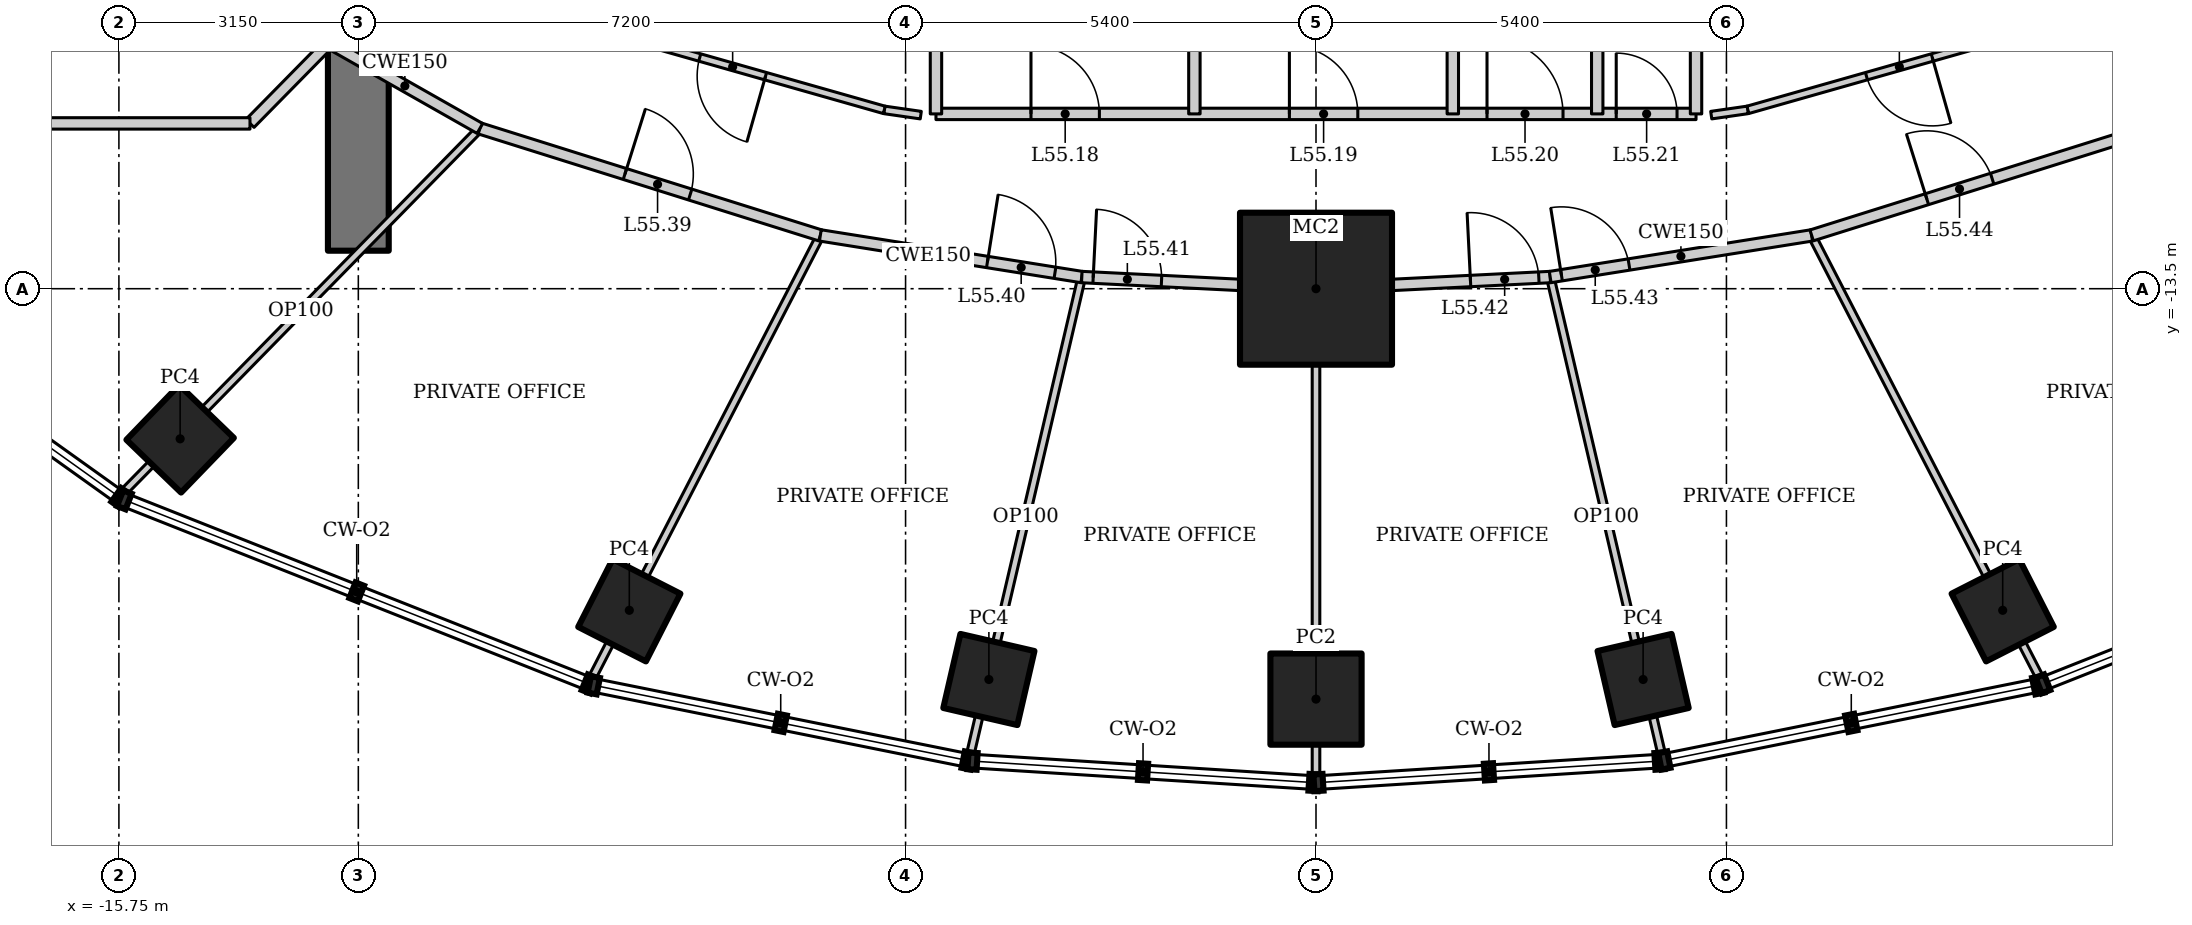
"""IFC4 building model, lengths in metres.
Left out: names, types, materials, properties, quantities, classifications, styles, units other than length and angle.
Written with IfcOpenShell. Run it as: python <this file> out.ifc"""

import sys

from ifc_helpers import new_model, si_unit, direction, frame, frame_2d, origin, origin_2d, place, context, subcontext, project, spatial, rectangle, hollow_rectangle, extrude, element, fill, save


model = new_model("IFC4")
c1 = context("Model", 3, precision=1e-05, world=origin(), true_north=direction((0.0, 1.0)))
c2 = subcontext(c1, "Body", "Model", "MODEL_VIEW")
j1 = project(units=[si_unit("LENGTHUNIT", "METRE"), si_unit("PLANEANGLEUNIT", "RADIAN")], contexts=[c1])
p1 = place(None, origin())
s1 = spatial("IfcSite", under=j1, at=p1, CompositionType="ELEMENT")
p2 = place(p1, origin())
s2 = spatial("IfcBuilding", under=s1, at=p2, CompositionType="ELEMENT")
p3 = place(p2, frame((0.0, 0.0, 236.8)))
s3 = spatial("IfcBuildingStorey", under=s2, at=p3, CompositionType="ELEMENT", Elevation=236.8)
p4 = place(p3, frame((0.0, -13.5, 0.0), z_axis=(0.0, 0.0, 1.0), x_axis=(1.0, 0.0, 0.0)))
e1 = element("IfcColumn", 1, at=p4, inside=s3, PredefinedType="COLUMN", context=c2, shape_type="SweptSolid", body=[
    extrude(hollow_rectangle(XDim=2.0, YDim=2.0, WallThickness=0.17, at=origin_2d()), origin(), (0.0, 0.0, 1.0), 4.2),
])
for number, where, z_axis, x_axis in (
    (2, (-14.944, -15.475, 0.0), (0.0, 0.0, 1.0), (0.695, 0.719, 0.0)),
    (3, (-9.035, -17.731, 0.0), (0.0, 0.0, 1.0), (0.454, 0.891, 0.0)),
    (4, (-4.304, -18.642, 0.0), (0.0, 0.0, 1.0), (0.225, 0.974, 0.0)),
):
    element("IfcColumn", number, at=place(p3, frame(where, z_axis=z_axis, x_axis=x_axis)), inside=s3, PredefinedType="COLUMN", context=c2, shape_type="SweptSolid", body=[
        extrude(hollow_rectangle(XDim=1.0, YDim=1.0, WallThickness=0.08, at=origin_2d()), origin(), (0.0, 0.0, 1.0), 4.2),
    ])
p5 = place(p3, frame((0.0, -18.9, 0.0), z_axis=(0.0, 0.0, 1.0), x_axis=(1.0, 0.0, 0.0)))
e5 = element("IfcColumn", 5, at=p5, inside=s3, PredefinedType="COLUMN", context=c2, shape_type="SweptSolid", body=[
    extrude(hollow_rectangle(XDim=1.2, YDim=1.2, WallThickness=0.1, at=origin_2d()), origin(), (0.0, 0.0, 1.0), 4.2),
])
for number, where, z_axis, x_axis in (
    (6, (4.304, -18.642, 0.0), (0.0, 0.0, 1.0), (0.974, 0.225, 0.0)),
    (7, (9.035, -17.731, 0.0), (0.0, 0.0, 1.0), (0.891, 0.454, 0.0)),
):
    element("IfcColumn", number, at=place(p3, frame(where, z_axis=z_axis, x_axis=x_axis)), inside=s3, PredefinedType="COLUMN", context=c2, shape_type="SweptSolid", body=[
        extrude(hollow_rectangle(XDim=1.0, YDim=1.0, WallThickness=0.08, at=origin_2d()), origin(), (0.0, 0.0, 1.0), 4.2),
    ])
p6 = place(p3, frame((-12.6, 13.0, 0.0), z_axis=(0.0, 0.0, 1.0), x_axis=(0.0, -1.0, 0.0)))
e8 = element("IfcWall", 8, at=p6, inside=s3, PredefinedType="SHEAR", context=c2, shape_type="SweptSolid", body=[
    extrude(rectangle(XDim=26.0, YDim=0.8, at=frame_2d((13.0, 0.0))), origin(), (0.0, 0.0, 1.0), 4.2),
])
p7 = place(p6, frame((12.1, 0.0, 0.0)))
e9 = element("IfcOpeningElement", 9, at=p7, cuts=e8, PredefinedType="OPENING", context=c2, shape_type="SweptSolid", body=[
    extrude(rectangle(XDim=1.8, YDim=2.1, at=frame_2d((0.9, 1.05))), frame((0.0, 0.41, 0.0), z_axis=(0.0, -1.0, 0.0), x_axis=(1.0, 0.0, 0.0)), (0.0, 0.0, 1.0), 0.82),
])
p8 = place(p3, frame((-15.709, -16.199, 0.0), z_axis=(0.0, 0.0, 1.0), x_axis=(0.699758297028, 0.71437967898, 0.0)))
e10 = element("IfcWall", 10, at=p8, inside=s3, PredefinedType="PARTITIONING", context=c2, shape_type="SweptSolid", body=[
    extrude(rectangle(XDim=6.729, YDim=0.1, at=frame_2d((3.365, 0.0))), origin(), (0.0, 0.0, 1.0), 3.41),
])
p9 = place(p3, frame((-9.54, -18.65, 0.0), z_axis=(0.0, 0.0, 1.0), x_axis=(0.458420942987, 0.888735190611, 0.0)))
e11 = element("IfcWall", 11, at=p9, inside=s3, PredefinedType="PARTITIONING", context=c2, shape_type="SweptSolid", body=[
    extrude(rectangle(XDim=6.584, YDim=0.1, at=frame_2d((3.292, 0.0))), origin(), (0.0, 0.0, 1.0), 3.293),
])
p10 = place(p3, frame((-4.556, -19.657, 0.0), z_axis=(0.0, 0.0, 1.0), x_axis=(0.227524978141, 0.973772244584, 0.0)))
e12 = element("IfcWall", 12, at=p10, inside=s3, PredefinedType="PARTITIONING", context=c2, shape_type="SweptSolid", body=[
    extrude(rectangle(XDim=6.48, YDim=0.1, at=frame_2d((3.24, 0.0))), origin(), (0.0, 0.0, 1.0), 3.293),
])
p11 = place(p3, frame((0.0, -19.945, 0.0), z_axis=(0.0, 0.0, 1.0), x_axis=(0.0, 1.0, 0.0)))
e13 = element("IfcWall", 13, at=p11, inside=s3, PredefinedType="PARTITIONING", context=c2, shape_type="SweptSolid", body=[
    extrude(rectangle(XDim=6.445, YDim=0.1, at=frame_2d((3.222, 0.0))), origin(), (0.0, 0.0, 1.0), 3.646),
])
p12 = place(p3, frame((4.556, -19.657, 0.0), z_axis=(0.0, 0.0, 1.0), x_axis=(-0.227524978141, 0.973772244584, 0.0)))
e14 = element("IfcWall", 14, at=p12, inside=s3, PredefinedType="PARTITIONING", context=c2, shape_type="SweptSolid", body=[
    extrude(rectangle(XDim=6.48, YDim=0.1, at=frame_2d((3.24, 0.0))), origin(), (0.0, 0.0, 1.0), 3.293),
])
p13 = place(p3, frame((9.54, -18.65, 0.0), z_axis=(0.0, 0.0, 1.0), x_axis=(-0.458420942987, 0.888735190611, 0.0)))
e15 = element("IfcWall", 15, at=p13, inside=s3, PredefinedType="PARTITIONING", context=c2, shape_type="SweptSolid", body=[
    extrude(rectangle(XDim=6.584, YDim=0.1, at=frame_2d((3.292, 0.0))), origin(), (0.0, 0.0, 1.0), 3.293),
])
p14 = place(p3, frame((-11.001, -11.392, 0.0), z_axis=(0.0, 0.0, 1.0), x_axis=(0.954031103669, -0.299707612903, 0.0)))
e16 = element("IfcWall", 16, at=p14, inside=s3, PredefinedType="PARTITIONING", context=c2, shape_type="SweptSolid", body=[
    extrude(rectangle(XDim=4.695, YDim=0.15, at=frame_2d((2.348, 0.0))), origin(), (0.0, 0.0, 1.0), 4.05),
])
p15 = place(p14, frame((2.0, 0.0, 0.0)))
e17 = element("IfcOpeningElement", 17, at=p15, cuts=e16, PredefinedType="OPENING", context=c2, shape_type="SweptSolid", body=[
    extrude(rectangle(XDim=0.9, YDim=2.1, at=frame_2d((0.45, 1.05))), frame((0.0, 0.085, 0.0), z_axis=(0.0, -1.0, 0.0), x_axis=(1.0, 0.0, 0.0)), (0.0, 0.0, 1.0), 0.17),
])
p16 = place(p3, frame((-6.521, -12.799, 0.0), z_axis=(0.0, 0.0, 1.0), x_axis=(0.987554093087, -0.157279729233, 0.0)))
e18 = element("IfcWall", 18, at=p16, inside=s3, PredefinedType="PARTITIONING", context=c2, shape_type="SweptSolid", body=[
    extrude(rectangle(XDim=3.483, YDim=0.15, at=frame_2d((1.742, 0.0))), origin(), (0.0, 0.0, 1.0), 4.05),
])
p17 = place(p16, frame((2.226, 0.0, 0.0)))
e19 = element("IfcOpeningElement", 19, at=p17, cuts=e18, PredefinedType="OPENING", context=c2, shape_type="SweptSolid", body=[
    extrude(rectangle(XDim=0.9, YDim=2.1, at=frame_2d((0.45, 1.05))), frame((0.0, 0.085, 0.0), z_axis=(0.0, -1.0, 0.0), x_axis=(1.0, 0.0, 0.0)), (0.0, 0.0, 1.0), 0.17),
])
p18 = place(p3, frame((-3.081, -13.347, 0.0), z_axis=(0.0, 0.0, 1.0), x_axis=(0.99876434787, -0.049696855278, 0.0)))
e20 = element("IfcWall", 20, at=p18, inside=s3, PredefinedType="PARTITIONING", context=c2, shape_type="SweptSolid", body=[
    extrude(rectangle(XDim=3.085, YDim=0.15, at=frame_2d((1.542, 0.0))), origin(), (0.0, 0.0, 1.0), 4.05),
])
p19 = place(p18, frame((0.15, 0.0, 0.0)))
e21 = element("IfcOpeningElement", 21, at=p19, cuts=e20, PredefinedType="OPENING", context=c2, shape_type="SweptSolid", body=[
    extrude(rectangle(XDim=0.9, YDim=2.1, at=frame_2d((0.45, 1.05))), frame((0.0, 0.085, 0.0), z_axis=(0.0, -1.0, 0.0), x_axis=(1.0, 0.0, 0.0)), (0.0, 0.0, 1.0), 0.17),
])
p20 = place(p3, frame((0.0, -13.5, 0.0), z_axis=(0.0, 0.0, 1.0), x_axis=(0.99876434787, 0.049696855278, 0.0)))
e22 = element("IfcWall", 22, at=p20, inside=s3, PredefinedType="PARTITIONING", context=c2, shape_type="SweptSolid", body=[
    extrude(rectangle(XDim=3.085, YDim=0.15, at=frame_2d((1.542, 0.0))), origin(), (0.0, 0.0, 1.0), 4.05),
])
p21 = place(p20, frame((2.035, 0.0, 0.0)))
e23 = element("IfcOpeningElement", 23, at=p21, cuts=e22, PredefinedType="OPENING", context=c2, shape_type="SweptSolid", body=[
    extrude(rectangle(XDim=0.9, YDim=2.1, at=frame_2d((0.45, 1.05))), frame((0.0, 0.085, 0.0), z_axis=(0.0, -1.0, 0.0), x_axis=(1.0, 0.0, 0.0)), (0.0, 0.0, 1.0), 0.17),
])
p22 = place(p3, frame((3.081, -13.347, 0.0), z_axis=(0.0, 0.0, 1.0), x_axis=(0.987554093087, 0.157279729233, 0.0)))
e24 = element("IfcWall", 24, at=p22, inside=s3, PredefinedType="PARTITIONING", context=c2, shape_type="SweptSolid", body=[
    extrude(rectangle(XDim=3.483, YDim=0.15, at=frame_2d((1.742, 0.0))), origin(), (0.0, 0.0, 1.0), 4.05),
])
p23 = place(p22, frame((0.15, 0.0, 0.0)))
e25 = element("IfcOpeningElement", 25, at=p23, cuts=e24, PredefinedType="OPENING", context=c2, shape_type="SweptSolid", body=[
    extrude(rectangle(XDim=0.9, YDim=2.1, at=frame_2d((0.45, 1.05))), frame((0.0, 0.085, 0.0), z_axis=(0.0, -1.0, 0.0), x_axis=(1.0, 0.0, 0.0)), (0.0, 0.0, 1.0), 0.17),
])
p24 = place(p3, frame((6.521, -12.799, 0.0), z_axis=(0.0, 0.0, 1.0), x_axis=(0.954031103669, 0.299707612903, 0.0)))
e26 = element("IfcWall", 26, at=p24, inside=s3, PredefinedType="PARTITIONING", context=c2, shape_type="SweptSolid", body=[
    extrude(rectangle(XDim=4.695, YDim=0.15, at=frame_2d((2.348, 0.0))), origin(), (0.0, 0.0, 1.0), 4.05),
])
p25 = place(p24, frame((1.589, 0.0, 0.0)))
e27 = element("IfcOpeningElement", 27, at=p25, cuts=e26, PredefinedType="OPENING", context=c2, shape_type="SweptSolid", body=[
    extrude(rectangle(XDim=0.9, YDim=2.1, at=frame_2d((0.45, 1.05))), frame((0.0, 0.085, 0.0), z_axis=(0.0, -1.0, 0.0), x_axis=(1.0, 0.0, 0.0)), (0.0, 0.0, 1.0), 0.17),
])
p26 = place(p3, frame((-5.0, -11.2, 0.0), z_axis=(0.0, 0.0, 1.0), x_axis=(1.0, 0.0, 0.0)))
e28 = element("IfcWall", 28, at=p26, inside=s3, PredefinedType="SOLIDWALL", context=c2, shape_type="SweptSolid", body=[
    extrude(rectangle(XDim=10.0, YDim=0.15, at=frame_2d((5.0, 0.0))), origin(), (0.0, 0.0, 1.0), 4.05),
])
p27 = place(p26, frame((1.25, 0.0, 0.0)))
e29 = element("IfcOpeningElement", 29, at=p27, cuts=e28, PredefinedType="OPENING", context=c2, shape_type="SweptSolid", body=[
    extrude(rectangle(XDim=0.9, YDim=2.1, at=frame_2d((0.45, 1.05))), frame((0.0, 0.085, 0.0), z_axis=(0.0, -1.0, 0.0), x_axis=(1.0, 0.0, 0.0)), (0.0, 0.0, 1.0), 0.17),
])
p28 = place(p26, frame((4.65, 0.0, 0.0)))
e30 = element("IfcOpeningElement", 30, at=p28, cuts=e28, PredefinedType="OPENING", context=c2, shape_type="SweptSolid", body=[
    extrude(rectangle(XDim=0.9, YDim=2.1, at=frame_2d((0.45, 1.05))), frame((0.0, 0.085, 0.0), z_axis=(0.0, -1.0, 0.0), x_axis=(1.0, 0.0, 0.0)), (0.0, 0.0, 1.0), 0.17),
])
p29 = place(p26, frame((7.25, 0.0, 0.0)))
e31 = element("IfcOpeningElement", 31, at=p29, cuts=e28, PredefinedType="OPENING", context=c2, shape_type="SweptSolid", body=[
    extrude(rectangle(XDim=1.0, YDim=2.1, at=frame_2d((0.5, 1.05))), frame((0.0, 0.085, 0.0), z_axis=(0.0, -1.0, 0.0), x_axis=(1.0, 0.0, 0.0)), (0.0, 0.0, 1.0), 0.17),
])
p30 = place(p26, frame((8.95, 0.0, 0.0)))
e32 = element("IfcOpeningElement", 32, at=p30, cuts=e28, PredefinedType="OPENING", context=c2, shape_type="SweptSolid", body=[
    extrude(rectangle(XDim=0.8, YDim=2.1, at=frame_2d((0.4, 1.05))), frame((0.0, 0.085, 0.0), z_axis=(0.0, -1.0, 0.0), x_axis=(1.0, 0.0, 0.0)), (0.0, 0.0, 1.0), 0.17),
])
for number, where, z_axis, x_axis in (
    (33, (-5.0, -7.8, 0.0), (0.0, 0.0, 1.0), (0.0, -1.0, 0.0)),
    (34, (5.0, -7.8, 0.0), (0.0, 0.0, 1.0), (0.0, -1.0, 0.0)),
    (35, (-1.6, -7.8, 0.0), (0.0, 0.0, 1.0), (0.0, -1.0, 0.0)),
):
    element("IfcWall", number, at=place(p3, frame(where, z_axis=z_axis, x_axis=x_axis)), inside=s3, PredefinedType="SOLIDWALL", context=c2, shape_type="SweptSolid", body=[
        extrude(rectangle(XDim=3.4, YDim=0.15, at=frame_2d((1.7, 0.0))), origin(), (0.0, 0.0, 1.0), 4.05),
    ])
p31 = place(p3, frame((1.8, -7.8, 0.0), z_axis=(0.0, 0.0, 1.0), x_axis=(0.0, -1.0, 0.0)))
e36 = element("IfcWall", 36, at=p31, inside=s3, PredefinedType="SOLIDWALL", context=c2, shape_type="SweptSolid", body=[
    extrude(rectangle(XDim=3.4, YDim=0.15, at=frame_2d((1.7, 0.0))), origin(), (0.0, 0.0, 1.0), 3.293),
])
p32 = place(p3, frame((3.7, -7.8, 0.0), z_axis=(0.0, 0.0, 1.0), x_axis=(0.0, -1.0, 0.0)))
e37 = element("IfcWall", 37, at=p32, inside=s3, PredefinedType="SOLIDWALL", context=c2, shape_type="SweptSolid", body=[
    extrude(rectangle(XDim=3.4, YDim=0.15, at=frame_2d((1.7, 0.0))), origin(), (0.0, 0.0, 1.0), 4.05),
])
p33 = place(p3, frame((-5.2, -11.216, 0.0), z_axis=(0.0, 0.0, 1.0), x_axis=(-0.989797891768, 0.142478536811, 0.0)))
e38 = element("IfcWall", 38, at=p33, inside=s3, PredefinedType="PARTITIONING", context=c2, shape_type="SweptSolid", body=[
    extrude(rectangle(XDim=0.485, YDim=0.1, at=frame_2d((0.242, 0.0))), origin(), (0.0, 0.0, 1.0), 4.05),
])
p34 = place(p3, frame((-5.68, -11.147, 0.0), z_axis=(0.0, 0.0, 1.0), x_axis=(-0.961973498971, 0.273142796496, 0.0)))
e39 = element("IfcWall", 39, at=p34, inside=s3, PredefinedType="PARTITIONING", context=c2, shape_type="SweptSolid", body=[
    extrude(rectangle(XDim=4.148, YDim=0.1, at=frame_2d((2.074, 0.0))), origin(), (0.0, 0.0, 1.0), 4.05),
])
p35 = place(p34, frame((1.624, 0.0, 0.0)))
e40 = element("IfcOpeningElement", 40, at=p35, cuts=e39, PredefinedType="OPENING", context=c2, shape_type="SweptSolid", body=[
    extrude(rectangle(XDim=0.9, YDim=2.1, at=frame_2d((0.45, 1.05))), frame((0.0, 0.06, 0.0), z_axis=(0.0, -1.0, 0.0), x_axis=(1.0, 0.0, 0.0)), (0.0, 0.0, 1.0), 0.12),
])
p36 = place(p3, frame((9.67, -10.014, 0.0), z_axis=(0.0, 0.0, 1.0), x_axis=(-0.961973498971, -0.273142796496, 0.0)))
e41 = element("IfcWall", 41, at=p36, inside=s3, PredefinedType="PARTITIONING", context=c2, shape_type="SweptSolid", body=[
    extrude(rectangle(XDim=4.148, YDim=0.1, at=frame_2d((2.074, 0.0))), origin(), (0.0, 0.0, 1.0), 4.05),
])
p37 = place(p36, frame((1.624, 0.0, 0.0)))
e42 = element("IfcOpeningElement", 42, at=p37, cuts=e41, PredefinedType="OPENING", context=c2, shape_type="SweptSolid", body=[
    extrude(rectangle(XDim=0.9, YDim=2.1, at=frame_2d((0.45, 1.05))), frame((0.0, 0.06, 0.0), z_axis=(0.0, -1.0, 0.0), x_axis=(1.0, 0.0, 0.0)), (0.0, 0.0, 1.0), 0.12),
])
p38 = place(p3, frame((5.68, -11.147, 0.0), z_axis=(0.0, 0.0, 1.0), x_axis=(-0.989797891768, -0.142478536811, 0.0)))
e43 = element("IfcWall", 43, at=p38, inside=s3, PredefinedType="PARTITIONING", context=c2, shape_type="SweptSolid", body=[
    extrude(rectangle(XDim=0.485, YDim=0.1, at=frame_2d((0.242, 0.0))), origin(), (0.0, 0.0, 1.0), 4.05),
])
p39 = place(p3, frame((-12.975, -10.271, 0.0), z_axis=(0.0, 0.0, 1.0), x_axis=(0.869722107117, -0.493541747366, 0.0)))
e44 = element("IfcWall", 44, at=p39, inside=s3, PredefinedType="PARTITIONING", context=c2, shape_type="SweptSolid", body=[
    extrude(rectangle(XDim=2.27, YDim=0.15, at=frame_2d((1.135, 0.0))), origin(), (0.0, 0.0, 1.0), 4.05),
])
p40 = place(p3, frame((-13.036, -10.319, 0.0), z_axis=(0.0, 0.0, 1.0), x_axis=(-0.701113567316, -0.713049623606, 0.0)))
e45 = element("IfcWall", 45, at=p40, inside=s3, PredefinedType="PARTITIONING", context=c2, shape_type="SweptSolid", body=[
    extrude(rectangle(XDim=1.411, YDim=0.15, at=frame_2d((0.706, 0.0))), origin(), (0.0, 0.0, 1.0), 4.05),
])
p41 = place(p3, frame((-14.025, -11.325, 0.0), z_axis=(0.0, 0.0, 1.0), x_axis=(-1.0, 0.0, 0.0)))
e46 = element("IfcWall", 46, at=p41, inside=s3, PredefinedType="PARTITIONING", context=c2, shape_type="SweptSolid", body=[
    extrude(rectangle(XDim=3.449, YDim=0.15, at=frame_2d((1.725, 0.0))), origin(), (0.0, 0.0, 1.0), 4.05),
])
p42 = place(p27, origin())
e47 = element("IfcDoor", 47, at=p42, inside=s3, OperationType="SINGLE_SWING_LEFT", PredefinedType="DOOR", context=c2, shape_type="SweptSolid", body=[
    extrude(rectangle(XDim=0.9, YDim=2.1, at=frame_2d((0.45, 1.05))), frame((0.0, 0.025, 0.0), z_axis=(0.0, -1.0, 0.0), x_axis=(1.0, 0.0, 0.0)), (0.0, 0.0, 1.0), 0.05),
])
fill(e29, e47)
p43 = place(p28, origin())
e48 = element("IfcDoor", 48, at=p43, inside=s3, OperationType="SINGLE_SWING_LEFT", PredefinedType="DOOR", context=c2, shape_type="SweptSolid", body=[
    extrude(rectangle(XDim=0.9, YDim=2.1, at=frame_2d((0.45, 1.05))), frame((0.0, 0.025, 0.0), z_axis=(0.0, -1.0, 0.0), x_axis=(1.0, 0.0, 0.0)), (0.0, 0.0, 1.0), 0.05),
])
fill(e30, e48)
p44 = place(p29, origin())
e49 = element("IfcDoor", 49, at=p44, inside=s3, OperationType="SINGLE_SWING_LEFT", PredefinedType="DOOR", context=c2, shape_type="SweptSolid", body=[
    extrude(rectangle(XDim=1.0, YDim=2.1, at=frame_2d((0.5, 1.05))), frame((0.0, 0.025, 0.0), z_axis=(0.0, -1.0, 0.0), x_axis=(1.0, 0.0, 0.0)), (0.0, 0.0, 1.0), 0.05),
])
fill(e31, e49)
p45 = place(p30, origin())
e50 = element("IfcDoor", 50, at=p45, inside=s3, OperationType="SINGLE_SWING_LEFT", PredefinedType="DOOR", context=c2, shape_type="SweptSolid", body=[
    extrude(rectangle(XDim=0.8, YDim=2.1, at=frame_2d((0.4, 1.05))), frame((0.0, 0.025, 0.0), z_axis=(0.0, -1.0, 0.0), x_axis=(1.0, 0.0, 0.0)), (0.0, 0.0, 1.0), 0.05),
])
fill(e32, e50)
p46 = place(p35, origin())
e51 = element("IfcDoor", 51, at=p46, inside=s3, OperationType="SINGLE_SWING_LEFT", PredefinedType="DOOR", context=c2, shape_type="SweptSolid", body=[
    extrude(rectangle(XDim=0.9, YDim=2.1, at=frame_2d((0.45, 1.05))), frame((0.0, 0.025, 0.0), z_axis=(0.0, -1.0, 0.0), x_axis=(1.0, 0.0, 0.0)), (0.0, 0.0, 1.0), 0.05),
])
fill(e40, e51)
p47 = place(p37, origin())
e52 = element("IfcDoor", 52, at=p47, inside=s3, OperationType="SINGLE_SWING_LEFT", PredefinedType="DOOR", context=c2, shape_type="SweptSolid", body=[
    extrude(rectangle(XDim=0.9, YDim=2.1, at=frame_2d((0.45, 1.05))), frame((0.0, 0.025, 0.0), z_axis=(0.0, -1.0, 0.0), x_axis=(1.0, 0.0, 0.0)), (0.0, 0.0, 1.0), 0.05),
])
fill(e42, e52)
p48 = place(p15, origin())
e53 = element("IfcDoor", 53, at=p48, inside=s3, OperationType="SINGLE_SWING_LEFT", PredefinedType="DOOR", context=c2, shape_type="SweptSolid", body=[
    extrude(rectangle(XDim=0.9, YDim=2.1, at=frame_2d((0.45, 1.05))), frame((0.0, 0.025, 0.0), z_axis=(0.0, -1.0, 0.0), x_axis=(1.0, 0.0, 0.0)), (0.0, 0.0, 1.0), 0.05),
])
fill(e17, e53)
p49 = place(p17, origin())
e54 = element("IfcDoor", 54, at=p49, inside=s3, OperationType="SINGLE_SWING_LEFT", PredefinedType="DOOR", context=c2, shape_type="SweptSolid", body=[
    extrude(rectangle(XDim=0.9, YDim=2.1, at=frame_2d((0.45, 1.05))), frame((0.0, 0.025, 0.0), z_axis=(0.0, -1.0, 0.0), x_axis=(1.0, 0.0, 0.0)), (0.0, 0.0, 1.0), 0.05),
])
fill(e19, e54)
p50 = place(p19, origin())
e55 = element("IfcDoor", 55, at=p50, inside=s3, OperationType="SINGLE_SWING_LEFT", PredefinedType="DOOR", context=c2, shape_type="SweptSolid", body=[
    extrude(rectangle(XDim=0.9, YDim=2.1, at=frame_2d((0.45, 1.05))), frame((0.0, 0.025, 0.0), z_axis=(0.0, -1.0, 0.0), x_axis=(1.0, 0.0, 0.0)), (0.0, 0.0, 1.0), 0.05),
])
fill(e21, e55)
p51 = place(p21, origin())
e56 = element("IfcDoor", 56, at=p51, inside=s3, OperationType="SINGLE_SWING_LEFT", PredefinedType="DOOR", context=c2, shape_type="SweptSolid", body=[
    extrude(rectangle(XDim=0.9, YDim=2.1, at=frame_2d((0.45, 1.05))), frame((0.0, 0.025, 0.0), z_axis=(0.0, -1.0, 0.0), x_axis=(1.0, 0.0, 0.0)), (0.0, 0.0, 1.0), 0.05),
])
fill(e23, e56)
p52 = place(p23, origin())
e57 = element("IfcDoor", 57, at=p52, inside=s3, OperationType="SINGLE_SWING_LEFT", PredefinedType="DOOR", context=c2, shape_type="SweptSolid", body=[
    extrude(rectangle(XDim=0.9, YDim=2.1, at=frame_2d((0.45, 1.05))), frame((0.0, 0.025, 0.0), z_axis=(0.0, -1.0, 0.0), x_axis=(1.0, 0.0, 0.0)), (0.0, 0.0, 1.0), 0.05),
])
fill(e25, e57)
p53 = place(p25, origin())
e58 = element("IfcDoor", 58, at=p53, inside=s3, OperationType="SINGLE_SWING_LEFT", PredefinedType="DOOR", context=c2, shape_type="SweptSolid", body=[
    extrude(rectangle(XDim=0.9, YDim=2.1, at=frame_2d((0.45, 1.05))), frame((0.0, 0.025, 0.0), z_axis=(0.0, -1.0, 0.0), x_axis=(1.0, 0.0, 0.0)), (0.0, 0.0, 1.0), 0.05),
])
fill(e27, e58)
save(model, sys.argv[1])
